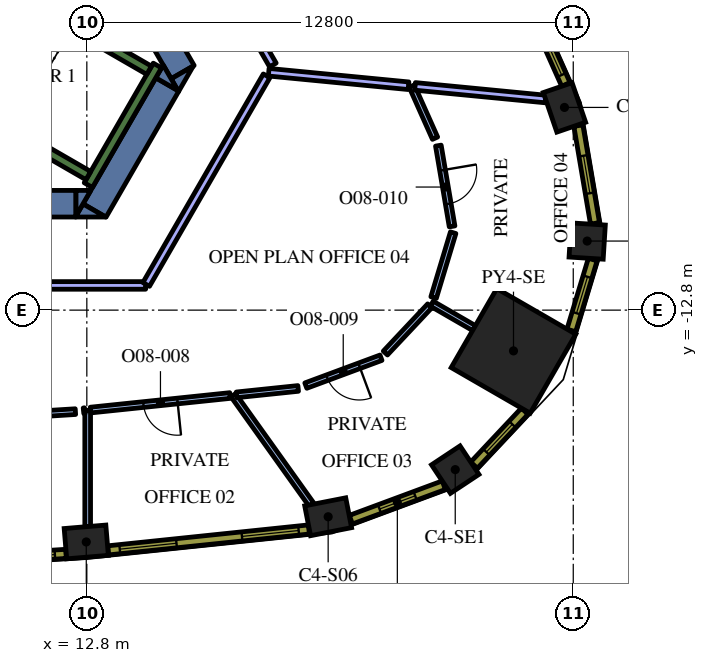
"""IFC4 building model, lengths in metres.
Left out: names, types, materials, properties, quantities, classifications, styles, units other than length and angle.
Written with IfcOpenShell. Run it as: python <this file> out.ifc"""

import sys

from ifc_helpers import new_model, si_unit, direction, frame, frame_2d, origin, origin_2d, place, context, subcontext, project, spatial, polyline, rectangle, outline, extrude, element, fill, save


model = new_model("IFC4")
c1 = context("Model", 3, precision=1e-05, world=origin(), true_north=direction((0.0, 1.0)))
c2 = subcontext(c1, "Body", "Model", "MODEL_VIEW")
j1 = project(units=[si_unit("LENGTHUNIT", "METRE"), si_unit("PLANEANGLEUNIT", "RADIAN")], contexts=[c1])
p1 = place(None, origin())
s1 = spatial("IfcSite", under=j1, at=p1, CompositionType="ELEMENT")
p2 = place(p1, origin())
s2 = spatial("IfcBuilding", under=s1, at=p2, CompositionType="ELEMENT")
p3 = place(p2, frame((0.0, 0.0, 226.8)))
s3 = spatial("IfcBuildingStorey", under=s2, at=p3, CompositionType="ELEMENT", Elevation=226.8)
p4 = place(p3, frame((24.027, -13.872, 0.0), z_axis=(0.0, 0.0, 1.0), x_axis=(0.866025403784, -0.5, 0.0)))
e1 = element("IfcColumn", 1, at=p4, inside=s3, PredefinedType="COLUMN", context=c2, shape_type="SweptSolid", body=[
    extrude(rectangle(XDim=2.4, YDim=2.4, at=origin_2d()), origin(), (0.0, 0.0, 1.0), 4.2),
])
for number, where, z_axis, x_axis in (
    (2, (12.785, -18.9, 0.0), (0.0, 0.0, 1.0), (0.997, 0.083, 0.0)),
    (3, (19.15, -18.237, 0.0), (0.0, 0.0, 1.0), (0.981, 0.192, 0.0)),
):
    element("IfcColumn", number, at=place(p3, frame(where, z_axis=z_axis, x_axis=x_axis)), inside=s3, PredefinedType="COLUMN", context=c2, shape_type="SweptSolid", body=[
        extrude(rectangle(XDim=1.1, YDim=0.8, at=origin_2d()), origin(), (0.0, 0.0, 1.0), 4.2),
    ])
for number, where, z_axis, x_axis in (
    (4, (22.494, -16.997, 0.0), (0.0, 0.0, 1.0), (0.833, 0.553, 0.0)),
    (5, (25.967, -10.982, 0.0), (0.0, 0.0, 1.0), (0.062, 0.998, 0.0)),
):
    element("IfcColumn", number, at=place(p3, frame(where, z_axis=z_axis, x_axis=x_axis)), inside=s3, PredefinedType="COLUMN", context=c2, shape_type="SweptSolid", body=[
        extrude(rectangle(XDim=0.9, YDim=0.9, at=origin_2d()), origin(), (0.0, 0.0, 1.0), 4.2),
    ])
p5 = place(p3, frame((25.369, -7.466, 0.0), z_axis=(0.0, 0.0, 1.0), x_axis=(-0.324074280638, 0.946031638281, 0.0)))
e6 = element("IfcColumn", 6, at=p5, inside=s3, PredefinedType="COLUMN", context=c2, shape_type="SweptSolid", body=[
    extrude(rectangle(XDim=1.1, YDim=0.8, at=origin_2d()), origin(), (0.0, 0.0, 1.0), 4.2),
])
p6 = place(p3, frame((9.085, 4.264, 0.0), z_axis=(0.0, 0.0, 1.0), x_axis=(0.499998082512, -0.866026510844, 0.0)))
e7 = element("IfcWall", 7, at=p6, inside=s3, PredefinedType="SOLIDWALL", context=c2, shape_type="SweptSolid", body=[
    extrude(rectangle(XDim=12.472, YDim=0.7, at=frame_2d((6.236, 0.0))), origin(), (0.0, 0.0, 1.0), 4.2),
])
p7 = place(p3, origin())
e8 = element("IfcWall", 8, at=p7, inside=s3, PredefinedType="SOLIDWALL", context=c2, shape_type="SweptSolid", body=[
    extrude(outline(polyline([(15.213, -7.05), (15.019, -6.714), (15.601, -6.378), (15.213, -7.05)])), origin(), (0.0, 0.0, 1.0), 4.2),
])
p8 = place(p3, frame((13.003, -10.179, 0.0), z_axis=(0.0, 0.0, 1.0), x_axis=(0.499972675833, 0.866041178825, 0.0)))
e9 = element("IfcWall", 9, at=p8, inside=s3, PredefinedType="SOLIDWALL", context=c2, shape_type="SweptSolid", body=[
    extrude(rectangle(XDim=3.829, YDim=0.7, at=frame_2d((1.915, 0.0))), origin(), (0.0, 0.0, 1.0), 4.2),
])
e10 = element("IfcWall", 10, at=p7, inside=s3, PredefinedType="SOLIDWALL", context=c2, shape_type="SweptSolid", body=[
    extrude(outline(polyline([(12.698, -10.005), (13.296, -10.35), (12.5, -10.35), (12.698, -10.005)])), origin(), (0.0, 0.0, 1.0), 4.2),
])
e11 = element("IfcWall", 11, at=p7, inside=s3, PredefinedType="SOLIDWALL", context=c2, shape_type="SweptSolid", body=[
    extrude(outline(polyline([(14.809, -6.35), (15.197, -7.022), (14.615, -6.686), (14.809, -6.35)])), origin(), (0.0, 0.0, 1.0), 4.2),
])
p9 = place(p3, frame((10.604, -10.0, 0.0), z_axis=(0.0, 0.0, 1.0), x_axis=(1.0, 0.0, 0.0)))
e12 = element("IfcWall", 12, at=p9, inside=s3, PredefinedType="SOLIDWALL", context=c2, shape_type="SweptSolid", body=[
    extrude(rectangle(XDim=1.909, YDim=0.7, at=frame_2d((0.955, 0.0))), origin(), (0.0, 0.0, 1.0), 4.2),
])
e13 = element("IfcWall", 13, at=p7, inside=s3, PredefinedType="SOLIDWALL", context=c2, shape_type="SweptSolid", body=[
    extrude(outline(polyline([(12.904, -9.65), (12.516, -10.322), (12.516, -9.65), (12.904, -9.65)])), origin(), (0.0, 0.0, 1.0), 4.2),
])
p10 = place(p3, frame((12.84, -9.511, 0.0), z_axis=(0.0, 0.0, 1.0), x_axis=(0.500048121057, 0.865997619297, 0.0)))
e14 = element("IfcWall", 14, at=p10, inside=s3, PredefinedType="SOLIDWALL", context=c2, shape_type="SweptSolid", body=[
    extrude(rectangle(XDim=3.634, YDim=0.25, at=frame_2d((1.817, 0.0))), origin(), (0.0, 0.0, 1.0), 4.2),
])
p11 = place(p3, frame((12.84, -9.261, 0.0), z_axis=(0.0, 0.0, 1.0), x_axis=(-0.866013990052, 0.500019768644, 0.0)))
e15 = element("IfcWall", 15, at=p11, inside=s3, PredefinedType="SOLIDWALL", context=c2, shape_type="SweptSolid", body=[
    extrude(rectangle(XDim=6.8, YDim=0.25, at=frame_2d((3.4, 0.0))), origin(), (0.0, 0.0, 1.0), 4.2),
])
p12 = place(p3, frame((8.334, -2.964, 0.0), z_axis=(0.0, 0.0, 1.0), x_axis=(0.866016039709, -0.500016218704, 0.0)))
e16 = element("IfcWall", 16, at=p12, inside=s3, PredefinedType="SOLIDWALL", context=c2, shape_type="SweptSolid", body=[
    extrude(rectangle(XDim=7.05, YDim=0.25, at=frame_2d((3.525, 0.0))), origin(), (0.0, 0.0, 1.0), 4.2),
])
p13 = place(p3, frame((12.823, -15.437, 0.0), z_axis=(0.0, 0.0, 1.0), x_axis=(0.0, -1.0, 0.0)))
e17 = element("IfcWall", 17, at=p13, inside=s3, PredefinedType="PARTITIONING", context=c2, shape_type="SweptSolid", body=[
    extrude(rectangle(XDim=3.058, YDim=0.15, at=frame_2d((1.529, 0.0))), origin(), (0.0, 0.0, 1.0), 3.45),
])
p14 = place(p3, frame((12.5, -15.471, 0.0), z_axis=(0.0, 0.0, 1.0), x_axis=(-0.998061916726, -0.0622286942, 0.0)))
e18 = element("IfcWall", 18, at=p14, inside=s3, PredefinedType="PARTITIONING", context=c2, shape_type="SweptSolid", body=[
    extrude(rectangle(XDim=5.995, YDim=0.15, at=frame_2d((2.998, 0.0))), origin(), (0.0, 0.0, 1.0), 3.45),
])
p15 = place(p14, frame((2.595, 0.0, 0.0)))
e19 = element("IfcOpeningElement", 19, at=p15, cuts=e18, PredefinedType="OPENING", context=c2, shape_type="SweptSolid", body=[
    extrude(rectangle(XDim=0.9, YDim=2.1, at=frame_2d((0.45, 1.05))), frame((0.0, 0.085, 0.0), z_axis=(0.0, -1.0, 0.0), x_axis=(1.0, 0.0, 0.0)), (0.0, 0.0, 1.0), 0.17),
])
p16 = place(p3, frame((12.713, -15.448, 0.0), z_axis=(0.0, 0.0, 1.0), x_axis=(0.995106821048, 0.098804932586, 0.0)))
e20 = element("IfcWall", 20, at=p16, inside=s3, PredefinedType="PARTITIONING", context=c2, shape_type="SweptSolid", body=[
    extrude(rectangle(XDim=0.035, YDim=0.15, at=frame_2d((0.017, 0.0))), origin(), (0.0, 0.0, 1.0), 3.45),
])
p17 = place(p3, frame((16.655, -15.038, 0.0), z_axis=(0.0, 0.0, 1.0), x_axis=(0.580996489012, -0.813906063226, 0.0)))
e21 = element("IfcWall", 21, at=p17, inside=s3, PredefinedType="PARTITIONING", context=c2, shape_type="SweptSolid", body=[
    extrude(rectangle(XDim=3.536, YDim=0.15, at=frame_2d((1.768, 0.0))), origin(), (0.0, 0.0, 1.0), 3.45),
])
p18 = place(p3, frame((16.569, -15.047, 0.0), z_axis=(0.0, 0.0, 1.0), x_axis=(-0.994621532294, -0.103576095197, 0.0)))
e22 = element("IfcWall", 22, at=p18, inside=s3, PredefinedType="PARTITIONING", context=c2, shape_type="SweptSolid", body=[
    extrude(rectangle(XDim=3.691, YDim=0.15, at=frame_2d((1.846, 0.0))), origin(), (0.0, 0.0, 1.0), 3.45),
])
p19 = place(p18, frame((1.391, 0.0, 0.0)))
e23 = element("IfcOpeningElement", 23, at=p19, cuts=e22, PredefinedType="OPENING", context=c2, shape_type="SweptSolid", body=[
    extrude(rectangle(XDim=0.9, YDim=2.1, at=frame_2d((0.45, 1.05))), frame((0.0, 0.085, 0.0), z_axis=(0.0, -1.0, 0.0), x_axis=(1.0, 0.0, 0.0)), (0.0, 0.0, 1.0), 0.17),
])
p20 = place(p3, frame((21.877, -12.63, 0.0), z_axis=(0.0, 0.0, 1.0), x_axis=(0.86599869919, -0.500046250861, 0.0)))
e24 = element("IfcWall", 24, at=p20, inside=s3, PredefinedType="PARTITIONING", context=c2, shape_type="SweptSolid", body=[
    extrude(rectangle(XDim=1.284, YDim=0.15, at=frame_2d((0.642, 0.0))), origin(), (0.0, 0.0, 1.0), 3.45),
])
p21 = place(p3, frame((16.74, -15.029, 0.0), z_axis=(0.0, 0.0, 1.0), x_axis=(0.994614871477, 0.103640037805, 0.0)))
e25 = element("IfcWall", 25, at=p21, inside=s3, PredefinedType="PARTITIONING", context=c2, shape_type="SweptSolid", body=[
    extrude(rectangle(XDim=1.63, YDim=0.15, at=frame_2d((0.815, 0.0))), origin(), (0.0, 0.0, 1.0), 3.45),
])
p22 = place(p3, frame((20.541, -14.052, 0.0), z_axis=(0.0, 0.0, 1.0), x_axis=(-0.937602119917, -0.347710029662, 0.0)))
e26 = element("IfcWall", 26, at=p22, inside=s3, PredefinedType="PARTITIONING", context=c2, shape_type="SweptSolid", body=[
    extrude(rectangle(XDim=2.11, YDim=0.15, at=frame_2d((1.055, 0.0))), origin(), (0.0, 0.0, 1.0), 3.45),
])
p23 = place(p22, frame((0.61, 0.0, 0.0)))
e27 = element("IfcOpeningElement", 27, at=p23, cuts=e26, PredefinedType="OPENING", context=c2, shape_type="SweptSolid", body=[
    extrude(rectangle(XDim=0.9, YDim=2.1, at=frame_2d((0.45, 1.05))), frame((0.0, 0.085, 0.0), z_axis=(0.0, -1.0, 0.0), x_axis=(1.0, 0.0, 0.0)), (0.0, 0.0, 1.0), 0.17),
])
p24 = place(p3, frame((20.656, -13.929, 0.0), z_axis=(0.0, 0.0, 1.0), x_axis=(0.684716940988, 0.728809104447, 0.0)))
e28 = element("IfcWall", 28, at=p24, inside=s3, PredefinedType="PARTITIONING", context=c2, shape_type="SweptSolid", body=[
    extrude(rectangle(XDim=1.705, YDim=0.15, at=frame_2d((0.853, 0.0))), origin(), (0.0, 0.0, 1.0), 3.45),
])
p25 = place(p3, frame((21.925, -12.469, 0.0), z_axis=(0.0, 0.0, 1.0), x_axis=(0.288767705809, 0.957399191603, 0.0)))
e29 = element("IfcWall", 29, at=p25, inside=s3, PredefinedType="PARTITIONING", context=c2, shape_type="SweptSolid", body=[
    extrude(rectangle(XDim=1.782, YDim=0.15, at=frame_2d((0.891, 0.0))), origin(), (0.0, 0.0, 1.0), 3.45),
])
p26 = place(p3, frame((22.05, -8.471, 0.0), z_axis=(0.0, 0.0, 1.0), x_axis=(0.167612004459, -0.985853039738, 0.0)))
e30 = element("IfcWall", 30, at=p26, inside=s3, PredefinedType="PARTITIONING", context=c2, shape_type="SweptSolid", body=[
    extrude(rectangle(XDim=2.156, YDim=0.15, at=frame_2d((1.078, 0.0))), origin(), (0.0, 0.0, 1.0), 3.45),
])
p27 = place(p26, frame((0.656, 0.0, 0.0)))
e31 = element("IfcOpeningElement", 31, at=p27, cuts=e30, PredefinedType="OPENING", context=c2, shape_type="SweptSolid", body=[
    extrude(rectangle(XDim=0.9, YDim=2.1, at=frame_2d((0.45, 1.05))), frame((0.0, 0.085, 0.0), z_axis=(0.0, -1.0, 0.0), x_axis=(1.0, 0.0, 0.0)), (0.0, 0.0, 1.0), 0.17),
])
p28 = place(p3, frame((21.963, -8.276, 0.0), z_axis=(0.0, 0.0, 1.0), x_axis=(-0.407510458183, 0.913200540118, 0.0)))
e32 = element("IfcWall", 32, at=p28, inside=s3, PredefinedType="PARTITIONING", context=c2, shape_type="SweptSolid", body=[
    extrude(rectangle(XDim=1.502, YDim=0.15, at=frame_2d((0.751, 0.0))), origin(), (0.0, 0.0, 1.0), 3.45),
])
p29 = place(p3, frame((21.437, -6.913, 0.0), z_axis=(0.0, 0.0, 1.0), x_axis=(0.995357015301, -0.096251816042, 0.0)))
e33 = element("IfcWall", 33, at=p29, inside=s3, PredefinedType="PARTITIONING", context=c2, shape_type="SweptSolid", body=[
    extrude(rectangle(XDim=3.45, YDim=0.2, at=frame_2d((1.725, 0.0))), origin(), (0.0, 0.0, 1.0), 3.45),
])
p30 = place(p3, frame((17.586, -6.54, 0.0), z_axis=(0.0, 0.0, 1.0), x_axis=(0.995358181524, -0.096239755158, 0.0)))
e34 = element("IfcWall", 34, at=p30, inside=s3, PredefinedType="PARTITIONING", context=c2, shape_type="SweptSolid", body=[
    extrude(rectangle(XDim=3.696, YDim=0.2, at=frame_2d((1.848, 0.0))), origin(), (0.0, 0.0, 1.0), 3.45),
])
p31 = place(p3, frame((6.517, -12.15, 0.0), z_axis=(0.0, 0.0, 1.0), x_axis=(1.0, 0.0, 0.0)))
e35 = element("IfcWall", 35, at=p31, inside=s3, PredefinedType="PARTITIONING", context=c2, shape_type="SweptSolid", body=[
    extrude(rectangle(XDim=7.83, YDim=0.2, at=frame_2d((3.915, 0.0))), origin(), (0.0, 0.0, 1.0), 3.45),
])
p32 = place(p31, frame((3.4, 0.0, 0.0)))
e36 = element("IfcOpeningElement", 36, at=p32, cuts=e35, PredefinedType="OPENING", context=c2, shape_type="SweptSolid", body=[
    extrude(rectangle(XDim=1.0, YDim=2.1, at=frame_2d((0.5, 1.05))), frame((0.0, 0.11, 0.0), z_axis=(0.0, -1.0, 0.0), x_axis=(1.0, 0.0, 0.0)), (0.0, 0.0, 1.0), 0.22),
])
p33 = place(p3, frame((14.362, -12.124, 0.0), z_axis=(0.0, 0.0, 1.0), x_axis=(0.500017005442, 0.866015585465, 0.0)))
e37 = element("IfcWall", 37, at=p33, inside=s3, PredefinedType="PARTITIONING", context=c2, shape_type="SweptSolid", body=[
    extrude(rectangle(XDim=6.338, YDim=0.2, at=frame_2d((3.169, 0.0))), origin(), (0.0, 0.0, 1.0), 3.45),
])
p34 = place(p3, frame((17.696, -6.35, 0.0), z_axis=(0.0, 0.0, 1.0), x_axis=(-0.499976825411, 0.866038783226, 0.0)))
e38 = element("IfcWall", 38, at=p34, inside=s3, PredefinedType="PARTITIONING", context=c2, shape_type="SweptSolid", body=[
    extrude(rectangle(XDim=4.653, YDim=0.2, at=frame_2d((2.326, 0.0))), origin(), (0.0, 0.0, 1.0), 3.45),
])
p35 = place(p3, frame((6.965, -19.543, 0.0), z_axis=(0.0, 0.0, 1.0), x_axis=(0.9980633213, 0.062206162685, 0.0)))
e39 = element("IfcWall", 39, at=p35, inside=s3, PredefinedType="SOLIDWALL", context=c2, shape_type="SweptSolid", body=[
    extrude(rectangle(XDim=5.298, YDim=0.24, at=frame_2d((2.649, 0.0))), origin(), (0.0, 0.0, 1.0), 3.95),
])
p36 = place(p35, frame((0.295, 0.0, 0.9)))
e40 = element("IfcOpeningElement", 40, at=p36, cuts=e39, PredefinedType="OPENING", context=c2, shape_type="SweptSolid", body=[
    extrude(rectangle(XDim=1.5, YDim=2.55, at=frame_2d((0.75, 1.275))), frame((0.0, 0.13, 0.0), z_axis=(0.0, -1.0, 0.0), x_axis=(1.0, 0.0, 0.0)), (0.0, 0.0, 1.0), 0.26),
])
p37 = place(p35, frame((3.504, 0.0, 0.9)))
e41 = element("IfcOpeningElement", 41, at=p37, cuts=e39, PredefinedType="OPENING", context=c2, shape_type="SweptSolid", body=[
    extrude(rectangle(XDim=1.5, YDim=2.55, at=frame_2d((0.75, 1.275))), frame((0.0, 0.13, 0.0), z_axis=(0.0, -1.0, 0.0), x_axis=(1.0, 0.0, 0.0)), (0.0, 0.0, 1.0), 0.26),
])
p38 = place(p3, frame((13.362, -19.121, 0.0), z_axis=(0.0, 0.0, 1.0), x_axis=(0.994621961215, 0.103571976272, 0.0)))
e42 = element("IfcWall", 42, at=p38, inside=s3, PredefinedType="SOLIDWALL", context=c2, shape_type="SweptSolid", body=[
    extrude(rectangle(XDim=5.311, YDim=0.24, at=frame_2d((2.655, 0.0))), origin(), (0.0, 0.0, 1.0), 3.95),
])
p39 = place(p38, frame((0.306, 0.0, 0.9)))
e43 = element("IfcOpeningElement", 43, at=p39, cuts=e42, PredefinedType="OPENING", context=c2, shape_type="SweptSolid", body=[
    extrude(rectangle(XDim=1.5, YDim=2.55, at=frame_2d((0.75, 1.275))), frame((0.0, 0.13, 0.0), z_axis=(0.0, -1.0, 0.0), x_axis=(1.0, 0.0, 0.0)), (0.0, 0.0, 1.0), 0.26),
])
p40 = place(p38, frame((3.539, 0.0, 0.9)))
e44 = element("IfcOpeningElement", 44, at=p40, cuts=e42, PredefinedType="OPENING", context=c2, shape_type="SweptSolid", body=[
    extrude(rectangle(XDim=1.5, YDim=2.55, at=frame_2d((0.75, 1.275))), frame((0.0, 0.13, 0.0), z_axis=(0.0, -1.0, 0.0), x_axis=(1.0, 0.0, 0.0)), (0.0, 0.0, 1.0), 0.26),
])
p41 = place(p3, frame((19.748, -18.314, 0.0), z_axis=(0.0, 0.0, 1.0), x_axis=(0.937569171184, 0.347798863203, 0.0)))
e45 = element("IfcWall", 45, at=p41, inside=s3, PredefinedType="SOLIDWALL", context=c2, shape_type="SweptSolid", body=[
    extrude(rectangle(XDim=2.609, YDim=0.24, at=frame_2d((1.305, 0.0))), origin(), (0.0, 0.0, 1.0), 3.95),
])
p42 = place(p41, frame((0.805, 0.0, 0.9)))
e46 = element("IfcOpeningElement", 46, at=p42, cuts=e45, PredefinedType="OPENING", context=c2, shape_type="SweptSolid", body=[
    extrude(rectangle(XDim=1.0, YDim=2.55, at=frame_2d((0.5, 1.275))), frame((0.0, 0.13, 0.0), z_axis=(0.0, -1.0, 0.0), x_axis=(1.0, 0.0, 0.0)), (0.0, 0.0, 1.0), 0.26),
])
p43 = place(p3, frame((22.989, -16.879, 0.0), z_axis=(0.0, 0.0, 1.0), x_axis=(0.684770274166, 0.728758994194, 0.0)))
e47 = element("IfcWall", 47, at=p43, inside=s3, PredefinedType="SOLIDWALL", context=c2, shape_type="SweptSolid", body=[
    extrude(rectangle(XDim=1.948, YDim=0.24, at=frame_2d((0.974, 0.0))), origin(), (0.0, 0.0, 1.0), 3.95),
])
p44 = place(p43, frame((0.474, 0.0, 0.9)))
e48 = element("IfcOpeningElement", 48, at=p44, cuts=e47, PredefinedType="OPENING", context=c2, shape_type="SweptSolid", body=[
    extrude(rectangle(XDim=1.0, YDim=2.55, at=frame_2d((0.5, 1.275))), frame((0.0, 0.13, 0.0), z_axis=(0.0, -1.0, 0.0), x_axis=(1.0, 0.0, 0.0)), (0.0, 0.0, 1.0), 0.26),
])
p45 = place(p3, frame((25.55, -13.335, 0.0), z_axis=(0.0, 0.0, 1.0), x_axis=(0.288727209095, 0.957411405159, 0.0)))
e49 = element("IfcWall", 49, at=p45, inside=s3, PredefinedType="SOLIDWALL", context=c2, shape_type="SweptSolid", body=[
    extrude(rectangle(XDim=1.948, YDim=0.24, at=frame_2d((0.974, 0.0))), origin(), (0.0, 0.0, 1.0), 3.95),
])
p46 = place(p45, frame((0.474, 0.0, 0.9)))
e50 = element("IfcOpeningElement", 50, at=p46, cuts=e49, PredefinedType="OPENING", context=c2, shape_type="SweptSolid", body=[
    extrude(rectangle(XDim=1.0, YDim=2.55, at=frame_2d((0.5, 1.275))), frame((0.0, 0.13, 0.0), z_axis=(0.0, -1.0, 0.0), x_axis=(1.0, 0.0, 0.0)), (0.0, 0.0, 1.0), 0.26),
])
p47 = place(p3, frame((26.172, -10.517, 0.0), z_axis=(0.0, 0.0, 1.0), x_axis=(-0.167660055546, 0.985844869021, 0.0)))
e51 = element("IfcWall", 51, at=p47, inside=s3, PredefinedType="SOLIDWALL", context=c2, shape_type="SweptSolid", body=[
    extrude(rectangle(XDim=2.609, YDim=0.24, at=frame_2d((1.305, 0.0))), origin(), (0.0, 0.0, 1.0), 3.95),
])
p48 = place(p47, frame((0.805, 0.0, 0.9)))
e52 = element("IfcOpeningElement", 52, at=p48, cuts=e51, PredefinedType="OPENING", context=c2, shape_type="SweptSolid", body=[
    extrude(rectangle(XDim=1.0, YDim=2.55, at=frame_2d((0.5, 1.275))), frame((0.0, 0.13, 0.0), z_axis=(0.0, -1.0, 0.0), x_axis=(1.0, 0.0, 0.0)), (0.0, 0.0, 1.0), 0.26),
])
p49 = place(p3, frame((25.405, -6.861, 0.0), z_axis=(0.0, 0.0, 1.0), x_axis=(-0.407579651789, 0.913169659728, 0.0)))
e53 = element("IfcWall", 53, at=p49, inside=s3, PredefinedType="SOLIDWALL", context=c2, shape_type="SweptSolid", body=[
    extrude(rectangle(XDim=5.311, YDim=0.24, at=frame_2d((2.655, 0.0))), origin(), (0.0, 0.0, 1.0), 3.95),
])
p50 = place(p49, frame((0.271, 0.0, 0.9)))
e54 = element("IfcOpeningElement", 54, at=p50, cuts=e53, PredefinedType="OPENING", context=c2, shape_type="SweptSolid", body=[
    extrude(rectangle(XDim=1.5, YDim=2.55, at=frame_2d((0.75, 1.275))), frame((0.0, 0.13, 0.0), z_axis=(0.0, -1.0, 0.0), x_axis=(1.0, 0.0, 0.0)), (0.0, 0.0, 1.0), 0.26),
])
p51 = place(p49, frame((3.504, 0.0, 0.9)))
e55 = element("IfcOpeningElement", 55, at=p51, cuts=e53, PredefinedType="OPENING", context=c2, shape_type="SweptSolid", body=[
    extrude(rectangle(XDim=1.5, YDim=2.55, at=frame_2d((0.75, 1.275))), frame((0.0, 0.13, 0.0), z_axis=(0.0, -1.0, 0.0), x_axis=(1.0, 0.0, 0.0)), (0.0, 0.0, 1.0), 0.26),
])
p52 = place(p19, origin())
e56 = element("IfcDoor", 56, at=p52, inside=s3, OperationType="SINGLE_SWING_LEFT", PredefinedType="DOOR", context=c2, shape_type="SweptSolid", body=[
    extrude(rectangle(XDim=0.9, YDim=2.1, at=frame_2d((0.45, 1.05))), frame((0.0, 0.025, 0.0), z_axis=(0.0, -1.0, 0.0), x_axis=(1.0, 0.0, 0.0)), (0.0, 0.0, 1.0), 0.05),
])
fill(e23, e56)
p53 = place(p23, origin())
e57 = element("IfcDoor", 57, at=p53, inside=s3, OperationType="SINGLE_SWING_RIGHT", PredefinedType="DOOR", context=c2, shape_type="SweptSolid", body=[
    extrude(rectangle(XDim=0.9, YDim=2.1, at=frame_2d((0.45, 1.05))), frame((0.0, 0.025, 0.0), z_axis=(0.0, -1.0, 0.0), x_axis=(1.0, 0.0, 0.0)), (0.0, 0.0, 1.0), 0.05),
])
fill(e27, e57)
p54 = place(p27, origin())
e58 = element("IfcDoor", 58, at=p54, inside=s3, OperationType="SINGLE_SWING_RIGHT", PredefinedType="DOOR", context=c2, shape_type="SweptSolid", body=[
    extrude(rectangle(XDim=0.9, YDim=2.1, at=frame_2d((0.45, 1.05))), frame((0.0, 0.025, 0.0), z_axis=(0.0, -1.0, 0.0), x_axis=(1.0, 0.0, 0.0)), (0.0, 0.0, 1.0), 0.05),
])
fill(e31, e58)
p55 = place(p37, origin())
e59 = element("IfcWindow", 59, at=p55, inside=s3, PartitioningType="SINGLE_PANEL", PredefinedType="WINDOW", context=c2, shape_type="SweptSolid", body=[
    extrude(rectangle(XDim=1.5, YDim=2.55, at=frame_2d((0.75, 1.275))), frame((0.0, 0.04, 0.0), z_axis=(0.0, -1.0, 0.0), x_axis=(1.0, 0.0, 0.0)), (0.0, 0.0, 1.0), 0.06),
])
fill(e41, e59)
p56 = place(p39, origin())
e60 = element("IfcWindow", 60, at=p56, inside=s3, PartitioningType="SINGLE_PANEL", PredefinedType="WINDOW", context=c2, shape_type="SweptSolid", body=[
    extrude(rectangle(XDim=1.5, YDim=2.55, at=frame_2d((0.75, 1.275))), frame((0.0, 0.04, 0.0), z_axis=(0.0, -1.0, 0.0), x_axis=(1.0, 0.0, 0.0)), (0.0, 0.0, 1.0), 0.06),
])
fill(e43, e60)
p57 = place(p40, origin())
e61 = element("IfcWindow", 61, at=p57, inside=s3, PartitioningType="SINGLE_PANEL", PredefinedType="WINDOW", context=c2, shape_type="SweptSolid", body=[
    extrude(rectangle(XDim=1.5, YDim=2.55, at=frame_2d((0.75, 1.275))), frame((0.0, 0.04, 0.0), z_axis=(0.0, -1.0, 0.0), x_axis=(1.0, 0.0, 0.0)), (0.0, 0.0, 1.0), 0.06),
])
fill(e44, e61)
p58 = place(p42, origin())
e62 = element("IfcWindow", 62, at=p58, inside=s3, PartitioningType="SINGLE_PANEL", PredefinedType="WINDOW", context=c2, shape_type="SweptSolid", body=[
    extrude(rectangle(XDim=1.0, YDim=2.55, at=frame_2d((0.5, 1.275))), frame((0.0, 0.04, 0.0), z_axis=(0.0, -1.0, 0.0), x_axis=(1.0, 0.0, 0.0)), (0.0, 0.0, 1.0), 0.06),
])
fill(e46, e62)
p59 = place(p44, origin())
e63 = element("IfcWindow", 63, at=p59, inside=s3, PartitioningType="SINGLE_PANEL", PredefinedType="WINDOW", context=c2, shape_type="SweptSolid", body=[
    extrude(rectangle(XDim=1.0, YDim=2.55, at=frame_2d((0.5, 1.275))), frame((0.0, 0.04, 0.0), z_axis=(0.0, -1.0, 0.0), x_axis=(1.0, 0.0, 0.0)), (0.0, 0.0, 1.0), 0.06),
])
fill(e48, e63)
p60 = place(p46, origin())
e64 = element("IfcWindow", 64, at=p60, inside=s3, PartitioningType="SINGLE_PANEL", PredefinedType="WINDOW", context=c2, shape_type="SweptSolid", body=[
    extrude(rectangle(XDim=1.0, YDim=2.55, at=frame_2d((0.5, 1.275))), frame((0.0, 0.04, 0.0), z_axis=(0.0, -1.0, 0.0), x_axis=(1.0, 0.0, 0.0)), (0.0, 0.0, 1.0), 0.06),
])
fill(e50, e64)
p61 = place(p48, origin())
e65 = element("IfcWindow", 65, at=p61, inside=s3, PartitioningType="SINGLE_PANEL", PredefinedType="WINDOW", context=c2, shape_type="SweptSolid", body=[
    extrude(rectangle(XDim=1.0, YDim=2.55, at=frame_2d((0.5, 1.275))), frame((0.0, 0.04, 0.0), z_axis=(0.0, -1.0, 0.0), x_axis=(1.0, 0.0, 0.0)), (0.0, 0.0, 1.0), 0.06),
])
fill(e52, e65)
p62 = place(p50, origin())
e66 = element("IfcWindow", 66, at=p62, inside=s3, PartitioningType="SINGLE_PANEL", PredefinedType="WINDOW", context=c2, shape_type="SweptSolid", body=[
    extrude(rectangle(XDim=1.5, YDim=2.55, at=frame_2d((0.75, 1.275))), frame((0.0, 0.04, 0.0), z_axis=(0.0, -1.0, 0.0), x_axis=(1.0, 0.0, 0.0)), (0.0, 0.0, 1.0), 0.06),
])
fill(e54, e66)
save(model, sys.argv[1])
